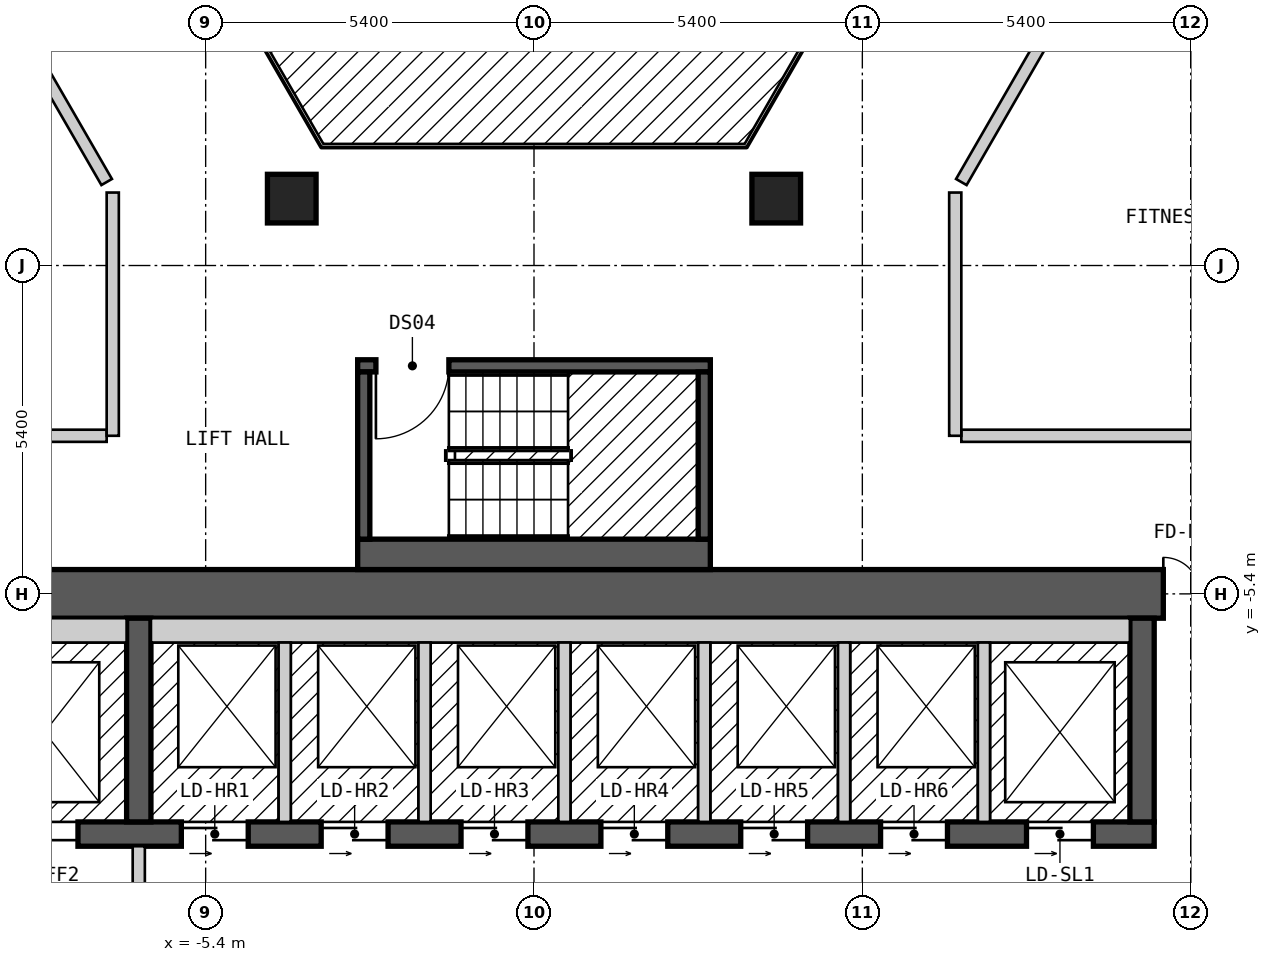
"""IFC4 building model, lengths in metres.
Left out: names, types, materials, properties, quantities, classifications, styles, units other than length and angle.
Written with IfcOpenShell. Run it as: python <this file> out.ifc"""

import sys

from ifc_helpers import new_model, si_unit, direction, frame, frame_2d, origin, origin_2d, place, context, subcontext, project, spatial, rectangle, extrude, element, fill, save


model = new_model("IFC4")
c1 = context("Model", 3, precision=1e-05, world=origin(), true_north=direction((0.0, 1.0)))
c2 = subcontext(c1, "Body", "Model", "MODEL_VIEW")
j1 = project(units=[si_unit("LENGTHUNIT", "METRE"), si_unit("PLANEANGLEUNIT", "RADIAN")], contexts=[c1])
p1 = place(None, origin())
s1 = spatial("IfcSite", under=j1, at=p1, CompositionType="ELEMENT")
p2 = place(p1, origin())
s2 = spatial("IfcBuilding", under=s1, at=p2, CompositionType="ELEMENT")
p3 = place(p2, frame((0.0, 0.0, 138.6)))
s3 = spatial("IfcBuildingStorey", under=s2, at=p3, CompositionType="ELEMENT", Elevation=138.6)
for number, where, z_axis, x_axis in (
    (1, (3.984, 1.1, 0.0), (0.0, 0.0, 1.0), (1.0, 0.0, 0.0)),
    (2, (-3.984, 1.1, 0.0), (0.0, 0.0, 1.0), (1.0, 0.0, 0.0)),
):
    element("IfcColumn", number, at=place(p3, frame(where, z_axis=z_axis, x_axis=x_axis)), inside=s3, PredefinedType="COLUMN", context=c2, shape_type="SweptSolid", body=[
        extrude(rectangle(XDim=0.8, YDim=0.8, at=origin_2d()), origin(), (0.0, 0.0, 1.0), 3.0),
    ])
p4 = place(p3, frame((-13.3, -5.4, 0.0), z_axis=(0.0, 0.0, 1.0), x_axis=(1.0, 0.0, 0.0)))
e3 = element("IfcWall", 3, at=p4, inside=s3, PredefinedType="SHEAR", context=c2, shape_type="SweptSolid", body=[
    extrude(rectangle(XDim=26.6, YDim=0.8, at=frame_2d((13.3, 0.0))), origin(), (0.0, 0.0, 1.0), 2.7),
])
p5 = place(p4, frame((23.65, 0.0, 0.0)))
e4 = element("IfcOpeningElement", 4, at=p5, cuts=e3, PredefinedType="OPENING", context=c2, shape_type="SweptSolid", body=[
    extrude(rectangle(XDim=1.2, YDim=2.1, at=frame_2d((0.6, 1.05))), frame((0.0, 0.41, 0.0), z_axis=(0.0, -1.0, 0.0), x_axis=(1.0, 0.0, 0.0)), (0.0, 0.0, 1.0), 0.82),
])
p6 = place(p3, frame((-12.5, -9.35, 0.0), z_axis=(0.0, 0.0, 1.0), x_axis=(1.0, 0.0, 0.0)))
e5 = element("IfcWall", 5, at=p6, inside=s3, PredefinedType="SHEAR", context=c2, shape_type="SweptSolid", body=[
    extrude(rectangle(XDim=22.7, YDim=0.4, at=frame_2d((11.35, 0.0))), origin(), (0.0, 0.0, 1.0), 2.7),
])
p7 = place(p6, frame((1.1, 0.0, 0.0)))
e6 = element("IfcOpeningElement", 6, at=p7, cuts=e5, PredefinedType="OPENING", context=c2, shape_type="SweptSolid", body=[
    extrude(rectangle(XDim=1.1, YDim=2.1, at=frame_2d((0.55, 1.05))), frame((0.0, 0.21, 0.0), z_axis=(0.0, -1.0, 0.0), x_axis=(1.0, 0.0, 0.0)), (0.0, 0.0, 1.0), 0.42),
])
p8 = place(p6, frame((3.9, 0.0, 0.0)))
e7 = element("IfcOpeningElement", 7, at=p8, cuts=e5, PredefinedType="OPENING", context=c2, shape_type="SweptSolid", body=[
    extrude(rectangle(XDim=1.1, YDim=2.1, at=frame_2d((0.55, 1.05))), frame((0.0, 0.21, 0.0), z_axis=(0.0, -1.0, 0.0), x_axis=(1.0, 0.0, 0.0)), (0.0, 0.0, 1.0), 0.42),
])
p9 = place(p6, frame((6.7, 0.0, 0.0)))
e8 = element("IfcOpeningElement", 8, at=p9, cuts=e5, PredefinedType="OPENING", context=c2, shape_type="SweptSolid", body=[
    extrude(rectangle(XDim=1.1, YDim=2.1, at=frame_2d((0.55, 1.05))), frame((0.0, 0.21, 0.0), z_axis=(0.0, -1.0, 0.0), x_axis=(1.0, 0.0, 0.0)), (0.0, 0.0, 1.0), 0.42),
])
p10 = place(p6, frame((9.0, 0.0, 0.0)))
e9 = element("IfcOpeningElement", 9, at=p10, cuts=e5, PredefinedType="OPENING", context=c2, shape_type="SweptSolid", body=[
    extrude(rectangle(XDim=1.1, YDim=2.1, at=frame_2d((0.55, 1.05))), frame((0.0, 0.21, 0.0), z_axis=(0.0, -1.0, 0.0), x_axis=(1.0, 0.0, 0.0)), (0.0, 0.0, 1.0), 0.42),
])
p11 = place(p6, frame((11.3, 0.0, 0.0)))
e10 = element("IfcOpeningElement", 10, at=p11, cuts=e5, PredefinedType="OPENING", context=c2, shape_type="SweptSolid", body=[
    extrude(rectangle(XDim=1.1, YDim=2.1, at=frame_2d((0.55, 1.05))), frame((0.0, 0.21, 0.0), z_axis=(0.0, -1.0, 0.0), x_axis=(1.0, 0.0, 0.0)), (0.0, 0.0, 1.0), 0.42),
])
p12 = place(p6, frame((13.6, 0.0, 0.0)))
e11 = element("IfcOpeningElement", 11, at=p12, cuts=e5, PredefinedType="OPENING", context=c2, shape_type="SweptSolid", body=[
    extrude(rectangle(XDim=1.1, YDim=2.1, at=frame_2d((0.55, 1.05))), frame((0.0, 0.21, 0.0), z_axis=(0.0, -1.0, 0.0), x_axis=(1.0, 0.0, 0.0)), (0.0, 0.0, 1.0), 0.42),
])
p13 = place(p6, frame((15.9, 0.0, 0.0)))
e12 = element("IfcOpeningElement", 12, at=p13, cuts=e5, PredefinedType="OPENING", context=c2, shape_type="SweptSolid", body=[
    extrude(rectangle(XDim=1.1, YDim=2.1, at=frame_2d((0.55, 1.05))), frame((0.0, 0.21, 0.0), z_axis=(0.0, -1.0, 0.0), x_axis=(1.0, 0.0, 0.0)), (0.0, 0.0, 1.0), 0.42),
])
p14 = place(p6, frame((18.2, 0.0, 0.0)))
e13 = element("IfcOpeningElement", 13, at=p14, cuts=e5, PredefinedType="OPENING", context=c2, shape_type="SweptSolid", body=[
    extrude(rectangle(XDim=1.1, YDim=2.1, at=frame_2d((0.55, 1.05))), frame((0.0, 0.21, 0.0), z_axis=(0.0, -1.0, 0.0), x_axis=(1.0, 0.0, 0.0)), (0.0, 0.0, 1.0), 0.42),
])
p15 = place(p6, frame((20.6, 0.0, 0.0)))
e14 = element("IfcOpeningElement", 14, at=p15, cuts=e5, PredefinedType="OPENING", context=c2, shape_type="SweptSolid", body=[
    extrude(rectangle(XDim=1.1, YDim=2.1, at=frame_2d((0.55, 1.05))), frame((0.0, 0.21, 0.0), z_axis=(0.0, -1.0, 0.0), x_axis=(1.0, 0.0, 0.0)), (0.0, 0.0, 1.0), 0.42),
])
for number, where, z_axis, x_axis in (
    (15, (-6.5, -9.15, 0.0), (0.0, 0.0, 1.0), (0.0, 1.0, 0.0)),
    (16, (10.0, -9.15, 0.0), (0.0, 0.0, 1.0), (0.0, 1.0, 0.0)),
):
    element("IfcWall", number, at=place(p3, frame(where, z_axis=z_axis, x_axis=x_axis)), inside=s3, PredefinedType="SHEAR", context=c2, shape_type="SweptSolid", body=[
        extrude(rectangle(XDim=3.35, YDim=0.4, at=frame_2d((1.675, 0.0))), origin(), (0.0, 0.0, 1.0), 2.7),
    ])
p16 = place(p3, frame((-2.9, -4.75, 0.0), z_axis=(0.0, 0.0, 1.0), x_axis=(1.0, 0.0, 0.0)))
e17 = element("IfcWall", 17, at=p16, inside=s3, PredefinedType="SOLIDWALL", context=c2, shape_type="SweptSolid", body=[
    extrude(rectangle(XDim=5.8, YDim=0.5, at=frame_2d((2.9, 0.0))), origin(), (0.0, 0.0, 1.0), 2.7),
])
p17 = place(p3, frame((-2.9, -1.65, 0.0), z_axis=(0.0, 0.0, 1.0), x_axis=(1.0, 0.0, 0.0)))
e18 = element("IfcWall", 18, at=p17, inside=s3, PredefinedType="SOLIDWALL", context=c2, shape_type="SweptSolid", body=[
    extrude(rectangle(XDim=5.8, YDim=0.2, at=frame_2d((2.9, 0.0))), origin(), (0.0, 0.0, 1.0), 2.7),
])
p18 = place(p17, frame((0.3, 0.0, 0.0)))
e19 = element("IfcOpeningElement", 19, at=p18, cuts=e18, PredefinedType="OPENING", context=c2, shape_type="SweptSolid", body=[
    extrude(rectangle(XDim=1.2, YDim=2.1, at=frame_2d((0.6, 1.05))), frame((0.0, 0.11, 0.0), z_axis=(0.0, -1.0, 0.0), x_axis=(1.0, 0.0, 0.0)), (0.0, 0.0, 1.0), 0.22),
])
for number, where, z_axis, x_axis in (
    (20, (-2.8, -4.5, 0.0), (0.0, 0.0, 1.0), (0.0, 1.0, 0.0)),
    (21, (2.8, -4.5, 0.0), (0.0, 0.0, 1.0), (0.0, 1.0, 0.0)),
):
    element("IfcWall", number, at=place(p3, frame(where, z_axis=z_axis, x_axis=x_axis)), inside=s3, PredefinedType="SOLIDWALL", context=c2, shape_type="SweptSolid", body=[
        extrude(rectangle(XDim=2.75, YDim=0.2, at=frame_2d((1.375, 0.0))), origin(), (0.0, 0.0, 1.0), 2.7),
    ])
p19 = place(p3, frame((-10.796, 7.9, 0.0), z_axis=(0.0, 0.0, 1.0), x_axis=(0.499954271211, -0.866051803703, 0.0)))
e22 = element("IfcWall", 22, at=p19, inside=s3, PredefinedType="PARTITIONING", context=c2, shape_type="SweptSolid", body=[
    extrude(rectangle(XDim=7.536, YDim=0.2, at=frame_2d((3.768, 0.0))), origin(), (0.0, 0.0, 1.0), 2.7),
])
p20 = place(p3, frame((7.967, 13.0, 0.0), z_axis=(0.0, 0.0, 1.0), x_axis=(0.50003774998, -0.866003607726, 0.0)))
e23 = element("IfcWall", 23, at=p20, inside=s3, PredefinedType="PARTITIONING", context=c2, shape_type="SweptSolid", body=[
    extrude(rectangle(XDim=14.433, YDim=0.2, at=frame_2d((7.217, 0.0))), origin(), (0.0, 0.0, 1.0), 2.7),
])
p21 = place(p20, frame((6.824, 0.0, 0.0)))
e24 = element("IfcOpeningElement", 24, at=p21, cuts=e23, PredefinedType="OPENING", context=c2, shape_type="SweptSolid", body=[
    extrude(rectangle(XDim=0.9, YDim=2.1, at=frame_2d((0.45, 1.05))), frame((0.0, 0.11, 0.0), z_axis=(0.0, -1.0, 0.0), x_axis=(1.0, 0.0, 0.0)), (0.0, 0.0, 1.0), 0.22),
])
p22 = place(p3, frame((9.296, 15.1, 0.0), z_axis=(0.0, 0.0, 1.0), x_axis=(0.499974024244, -0.866040400375, 0.0)))
e25 = element("IfcWall", 25, at=p22, inside=s3, PredefinedType="PARTITIONING", context=c2, shape_type="SweptSolid", body=[
    extrude(rectangle(XDim=16.857, YDim=0.2, at=frame_2d((8.429, 0.0))), origin(), (0.0, 0.0, 1.0), 2.7),
])
p23 = place(p22, frame((11.522, 0.0, 0.0)))
e26 = element("IfcOpeningElement", 26, at=p23, cuts=e25, PredefinedType="OPENING", context=c2, shape_type="SweptSolid", body=[
    extrude(rectangle(XDim=1.0, YDim=2.1, at=frame_2d((0.5, 1.05))), frame((0.0, 0.11, 0.0), z_axis=(0.0, -1.0, 0.0), x_axis=(1.0, 0.0, 0.0)), (0.0, 0.0, 1.0), 0.22),
])
p24 = place(p3, frame((-13.395, -2.8, 0.0), z_axis=(0.0, 0.0, 1.0), x_axis=(1.0, 0.0, 0.0)))
e27 = element("IfcWall", 27, at=p24, inside=s3, PredefinedType="PARTITIONING", context=c2, shape_type="SweptSolid", body=[
    extrude(rectangle(XDim=6.367, YDim=0.2, at=frame_2d((3.184, 0.0))), origin(), (0.0, 0.0, 1.0), 2.7),
])
p25 = place(p3, frame((7.028, -2.8, 0.0), z_axis=(0.0, 0.0, 1.0), x_axis=(1.0, 0.0, 0.0)))
e28 = element("IfcWall", 28, at=p25, inside=s3, PredefinedType="PARTITIONING", context=c2, shape_type="SweptSolid", body=[
    extrude(rectangle(XDim=6.25, YDim=0.2, at=frame_2d((3.125, 0.0))), origin(), (0.0, 0.0, 1.0), 2.7),
])
p26 = place(p3, frame((7.028, 1.373, 0.0), z_axis=(0.0, 0.0, 1.0), x_axis=(0.499954271211, 0.866051803703, 0.0)))
e29 = element("IfcWall", 29, at=p26, inside=s3, PredefinedType="PARTITIONING", context=c2, shape_type="SweptSolid", body=[
    extrude(rectangle(XDim=7.536, YDim=0.2, at=frame_2d((3.768, 0.0))), origin(), (0.0, 0.0, 1.0), 2.7),
])
for number, where, z_axis, x_axis in (
    (30, (6.928, -2.8, 0.0), (0.0, 0.0, 1.0), (0.0, 1.0, 0.0)),
    (31, (-6.928, -2.8, 0.0), (0.0, 0.0, 1.0), (0.0, 1.0, 0.0)),
):
    element("IfcWall", number, at=place(p3, frame(where, z_axis=z_axis, x_axis=x_axis)), inside=s3, PredefinedType="PARTITIONING", context=c2, shape_type="SweptSolid", body=[
        extrude(rectangle(XDim=4.0, YDim=0.2, at=frame_2d((2.0, 0.0))), origin(), (0.0, 0.0, 1.0), 2.7),
    ])
p27 = place(p3, frame((-12.1, -6.0, 0.0), z_axis=(0.0, 0.0, 1.0), x_axis=(1.0, 0.0, 0.0)))
e32 = element("IfcWall", 32, at=p27, inside=s3, PredefinedType="SOLIDWALL", context=c2, shape_type="SweptSolid", body=[
    extrude(rectangle(XDim=5.4, YDim=0.4, at=frame_2d((2.7, 0.0))), origin(), (0.0, 0.0, 1.0), 2.7),
])
p28 = place(p3, frame((-6.5, -14.45, 0.0), z_axis=(0.0, 0.0, 1.0), x_axis=(0.0, 1.0, 0.0)))
e33 = element("IfcWall", 33, at=p28, inside=s3, PredefinedType="PARTITIONING", context=c2, shape_type="SweptSolid", body=[
    extrude(rectangle(XDim=4.9, YDim=0.2, at=frame_2d((2.45, 0.0))), origin(), (0.0, 0.0, 1.0), 2.7),
])
p29 = place(p28, frame((3.15, 0.0, 0.0), z_axis=(0.0, 0.0, 1.0), x_axis=(-1.0, 0.0, 0.0)))
e34 = element("IfcOpeningElement", 34, at=p29, cuts=e33, PredefinedType="OPENING", context=c2, shape_type="SweptSolid", body=[
    extrude(rectangle(XDim=1.4, YDim=2.1, at=frame_2d((0.7, 1.05))), frame((0.0, 0.11, 0.0), z_axis=(0.0, -1.0, 0.0), x_axis=(1.0, 0.0, 0.0)), (0.0, 0.0, 1.0), 0.22),
])
p30 = place(p3, frame((-6.3, -6.0, 0.0), z_axis=(0.0, 0.0, 1.0), x_axis=(1.0, 0.0, 0.0)))
e35 = element("IfcWall", 35, at=p30, inside=s3, PredefinedType="SOLIDWALL", context=c2, shape_type="SweptSolid", body=[
    extrude(rectangle(XDim=16.1, YDim=0.4, at=frame_2d((8.05, 0.0))), origin(), (0.0, 0.0, 1.0), 2.7),
])
for number, where, z_axis, x_axis in (
    (36, (-4.1, -9.15, 0.0), (0.0, 0.0, 1.0), (0.0, 1.0, 0.0)),
    (37, (-1.8, -9.15, 0.0), (0.0, 0.0, 1.0), (0.0, 1.0, 0.0)),
    (38, (0.5, -9.15, 0.0), (0.0, 0.0, 1.0), (0.0, 1.0, 0.0)),
    (39, (2.8, -9.15, 0.0), (0.0, 0.0, 1.0), (0.0, 1.0, 0.0)),
    (40, (5.1, -9.15, 0.0), (0.0, 0.0, 1.0), (0.0, 1.0, 0.0)),
    (41, (7.4, -9.15, 0.0), (0.0, 0.0, 1.0), (0.0, 1.0, 0.0)),
):
    element("IfcWall", number, at=place(p3, frame(where, z_axis=z_axis, x_axis=x_axis)), inside=s3, PredefinedType="SOLIDWALL", context=c2, shape_type="SweptSolid", body=[
        extrude(rectangle(XDim=2.95, YDim=0.2, at=frame_2d((1.475, 0.0))), origin(), (0.0, 0.0, 1.0), 2.7),
    ])
p31 = place(p18, origin())
e42 = element("IfcDoor", 42, at=p31, inside=s3, OperationType="SINGLE_SWING_LEFT", PredefinedType="DOOR", context=c2, shape_type="SweptSolid", body=[
    extrude(rectangle(XDim=1.2, YDim=2.1, at=frame_2d((0.6, 1.05))), frame((0.0, 0.025, 0.0), z_axis=(0.0, -1.0, 0.0), x_axis=(1.0, 0.0, 0.0)), (0.0, 0.0, 1.0), 0.05),
])
fill(e19, e42)
p32 = place(p8, origin())
e43 = element("IfcDoor", 43, at=p32, inside=s3, OperationType="DOUBLE_DOOR_SLIDING", PredefinedType="DOOR", context=c2, shape_type="SweptSolid", body=[
    extrude(rectangle(XDim=1.1, YDim=2.1, at=frame_2d((0.55, 1.05))), frame((0.0, 0.025, 0.0), z_axis=(0.0, -1.0, 0.0), x_axis=(1.0, 0.0, 0.0)), (0.0, 0.0, 1.0), 0.05),
])
fill(e7, e43)
p33 = place(p9, origin())
e44 = element("IfcDoor", 44, at=p33, inside=s3, OperationType="DOUBLE_DOOR_SLIDING", PredefinedType="DOOR", context=c2, shape_type="SweptSolid", body=[
    extrude(rectangle(XDim=1.1, YDim=2.1, at=frame_2d((0.55, 1.05))), frame((0.0, 0.025, 0.0), z_axis=(0.0, -1.0, 0.0), x_axis=(1.0, 0.0, 0.0)), (0.0, 0.0, 1.0), 0.05),
])
fill(e8, e44)
p34 = place(p10, origin())
e45 = element("IfcDoor", 45, at=p34, inside=s3, OperationType="DOUBLE_DOOR_SLIDING", PredefinedType="DOOR", context=c2, shape_type="SweptSolid", body=[
    extrude(rectangle(XDim=1.1, YDim=2.1, at=frame_2d((0.55, 1.05))), frame((0.0, 0.025, 0.0), z_axis=(0.0, -1.0, 0.0), x_axis=(1.0, 0.0, 0.0)), (0.0, 0.0, 1.0), 0.05),
])
fill(e9, e45)
p35 = place(p11, origin())
e46 = element("IfcDoor", 46, at=p35, inside=s3, OperationType="DOUBLE_DOOR_SLIDING", PredefinedType="DOOR", context=c2, shape_type="SweptSolid", body=[
    extrude(rectangle(XDim=1.1, YDim=2.1, at=frame_2d((0.55, 1.05))), frame((0.0, 0.025, 0.0), z_axis=(0.0, -1.0, 0.0), x_axis=(1.0, 0.0, 0.0)), (0.0, 0.0, 1.0), 0.05),
])
fill(e10, e46)
p36 = place(p12, origin())
e47 = element("IfcDoor", 47, at=p36, inside=s3, OperationType="DOUBLE_DOOR_SLIDING", PredefinedType="DOOR", context=c2, shape_type="SweptSolid", body=[
    extrude(rectangle(XDim=1.1, YDim=2.1, at=frame_2d((0.55, 1.05))), frame((0.0, 0.025, 0.0), z_axis=(0.0, -1.0, 0.0), x_axis=(1.0, 0.0, 0.0)), (0.0, 0.0, 1.0), 0.05),
])
fill(e11, e47)
p37 = place(p13, origin())
e48 = element("IfcDoor", 48, at=p37, inside=s3, OperationType="DOUBLE_DOOR_SLIDING", PredefinedType="DOOR", context=c2, shape_type="SweptSolid", body=[
    extrude(rectangle(XDim=1.1, YDim=2.1, at=frame_2d((0.55, 1.05))), frame((0.0, 0.025, 0.0), z_axis=(0.0, -1.0, 0.0), x_axis=(1.0, 0.0, 0.0)), (0.0, 0.0, 1.0), 0.05),
])
fill(e12, e48)
p38 = place(p14, origin())
e49 = element("IfcDoor", 49, at=p38, inside=s3, OperationType="DOUBLE_DOOR_SLIDING", PredefinedType="DOOR", context=c2, shape_type="SweptSolid", body=[
    extrude(rectangle(XDim=1.1, YDim=2.1, at=frame_2d((0.55, 1.05))), frame((0.0, 0.025, 0.0), z_axis=(0.0, -1.0, 0.0), x_axis=(1.0, 0.0, 0.0)), (0.0, 0.0, 1.0), 0.05),
])
fill(e13, e49)
p39 = place(p15, origin())
e50 = element("IfcDoor", 50, at=p39, inside=s3, OperationType="DOUBLE_DOOR_SLIDING", PredefinedType="DOOR", context=c2, shape_type="SweptSolid", body=[
    extrude(rectangle(XDim=1.1, YDim=2.1, at=frame_2d((0.55, 1.05))), frame((0.0, 0.025, 0.0), z_axis=(0.0, -1.0, 0.0), x_axis=(1.0, 0.0, 0.0)), (0.0, 0.0, 1.0), 0.05),
])
fill(e14, e50)
p40 = place(p5, origin())
e51 = element("IfcDoor", 51, at=p40, inside=s3, OperationType="DOUBLE_DOOR_SINGLE_SWING", PredefinedType="DOOR", context=c2, shape_type="SweptSolid", body=[
    extrude(rectangle(XDim=1.2, YDim=2.1, at=frame_2d((0.6, 1.05))), frame((0.0, 0.025, 0.0), z_axis=(0.0, -1.0, 0.0), x_axis=(1.0, 0.0, 0.0)), (0.0, 0.0, 1.0), 0.05),
])
fill(e4, e51)
save(model, sys.argv[1])
